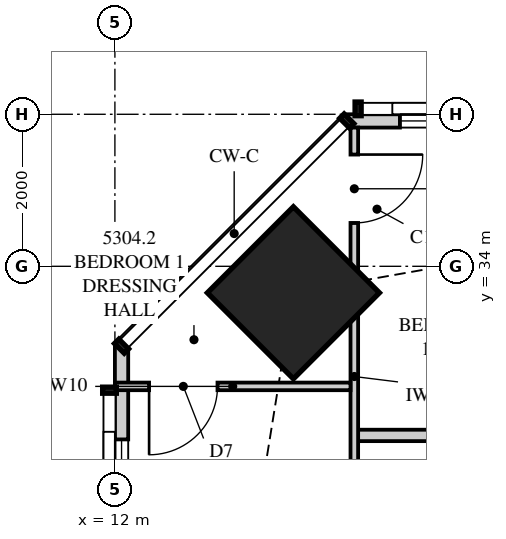
"""IFC4 building model, lengths in metres.
Left out: names, types, materials, properties, quantities, classifications, styles, units other than length and angle.
Written with IfcOpenShell. Run it as: python <this file> out.ifc"""

import sys

from ifc_helpers import new_model, si_unit, direction, frame, frame_2d, origin, origin_2d, place, context, subcontext, project, spatial, polyline, rectangle, outline, extrude, element, fill, save


model = new_model("IFC4")
c1 = context("Model", 3, precision=1e-05, world=origin(), true_north=direction((0.0, 1.0)))
c2 = subcontext(c1, "Body", "Model", "MODEL_VIEW")
j1 = project(units=[si_unit("LENGTHUNIT", "METRE"), si_unit("PLANEANGLEUNIT", "RADIAN")], contexts=[c1])
p1 = place(None, origin())
s1 = spatial("IfcSite", under=j1, at=p1, CompositionType="ELEMENT")
p2 = place(p1, origin())
s2 = spatial("IfcBuilding", under=s1, at=p2, CompositionType="ELEMENT")
p3 = place(p2, frame((0.0, 0.0, 194.55)))
s3 = spatial("IfcBuildingStorey", under=s2, at=p3, CompositionType="ELEMENT", Elevation=194.55)
p4 = place(p3, frame((14.348, 33.652, 0.0), z_axis=(0.0, 0.0, 1.0), x_axis=(0.707106781187, 0.707106781187, 0.0)))
e1 = element("IfcColumn", 1, at=p4, inside=s3, PredefinedType="COLUMN", context=c2, shape_type="SweptSolid", body=[
    extrude(rectangle(XDim=1.6, YDim=1.6, at=origin_2d()), origin(), (0.0, 0.0, 1.0), 3.35),
])
p5 = place(p3, frame((49.949, 35.913, 0.0), z_axis=(0.0, 0.0, 1.0), x_axis=(-1.0, 0.0, 0.0)))
e2 = element("IfcWall", 2, at=p5, inside=s3, PredefinedType="SOLIDWALL", context=c2, shape_type="SweptSolid", body=[
    extrude(outline(polyline([(0.0, 0.0), (34.897, 0.0), (34.897, 3.11), (27.91, 3.11), (27.91, 2.15), (27.836, 2.15), (27.836, 3.11), (27.699, 3.11), (27.699, 2.15), (7.199, 2.15), (7.199, 3.11), (7.062, 3.11), (7.062, 2.15), (6.987, 2.15), (6.987, 3.11), (0.0, 3.11), (0.0, 0.0)])), frame((0.0, 0.087, 0.0), z_axis=(0.0, -1.0, 0.0), x_axis=(1.0, 0.0, 0.0)), (0.0, 0.0, 1.0), 0.175),
])
p6 = place(p5, frame((2.149, 0.0, 0.4)))
e3 = element("IfcOpeningElement", 3, at=p6, cuts=e2, PredefinedType="OPENING", context=c2, shape_type="SweptSolid", body=[
    extrude(rectangle(XDim=1.8, YDim=1.7, at=frame_2d((0.9, 0.85))), frame((0.0, 0.097, 0.0), z_axis=(0.0, -1.0, 0.0), x_axis=(1.0, 0.0, 0.0)), (0.0, 0.0, 1.0), 0.195),
])
p7 = place(p5, frame((9.636, 0.0, 0.4)))
e4 = element("IfcOpeningElement", 4, at=p7, cuts=e2, PredefinedType="OPENING", context=c2, shape_type="SweptSolid", body=[
    extrude(rectangle(XDim=1.8, YDim=1.7, at=frame_2d((0.9, 0.85))), frame((0.0, 0.097, 0.0), z_axis=(0.0, -1.0, 0.0), x_axis=(1.0, 0.0, 0.0)), (0.0, 0.0, 1.0), 0.195),
])
p8 = place(p5, frame((13.174, 0.0, 0.0)))
e5 = element("IfcOpeningElement", 5, at=p8, cuts=e2, PredefinedType="OPENING", context=c2, shape_type="SweptSolid", body=[
    extrude(rectangle(XDim=1.8, YDim=2.1, at=frame_2d((0.9, 1.05))), frame((0.0, 0.097, 0.0), z_axis=(0.0, -1.0, 0.0), x_axis=(1.0, 0.0, 0.0)), (0.0, 0.0, 1.0), 0.195),
])
p9 = place(p5, frame((19.374, 0.0, 0.4)))
e6 = element("IfcOpeningElement", 6, at=p9, cuts=e2, PredefinedType="OPENING", context=c2, shape_type="SweptSolid", body=[
    extrude(rectangle(XDim=1.8, YDim=1.7, at=frame_2d((0.9, 0.85))), frame((0.0, 0.097, 0.0), z_axis=(0.0, -1.0, 0.0), x_axis=(1.0, 0.0, 0.0)), (0.0, 0.0, 1.0), 0.195),
])
p10 = place(p5, frame((23.224, 0.0, 0.4)))
e7 = element("IfcOpeningElement", 7, at=p10, cuts=e2, PredefinedType="OPENING", context=c2, shape_type="SweptSolid", body=[
    extrude(rectangle(XDim=2.4, YDim=1.7, at=frame_2d((1.2, 0.85))), frame((0.0, 0.097, 0.0), z_axis=(0.0, -1.0, 0.0), x_axis=(1.0, 0.0, 0.0)), (0.0, 0.0, 1.0), 0.195),
])
p11 = place(p5, frame((32.399, 0.0, 0.4)))
e8 = element("IfcOpeningElement", 8, at=p11, cuts=e2, PredefinedType="OPENING", context=c2, shape_type="SweptSolid", body=[
    extrude(rectangle(XDim=1.8, YDim=1.7, at=frame_2d((0.9, 0.85))), frame((0.0, 0.097, 0.0), z_axis=(0.0, -1.0, 0.0), x_axis=(1.0, 0.0, 0.0)), (0.0, 0.0, 1.0), 0.195),
])
p12 = place(p3, frame((12.087, 32.949, 0.0), z_axis=(0.0, 0.0, 1.0), x_axis=(0.0, -1.0, 0.0)))
e9 = element("IfcWall", 9, at=p12, inside=s3, PredefinedType="SOLIDWALL", context=c2, shape_type="SweptSolid", body=[
    extrude(outline(polyline([(0.0, 0.0), (29.897, 0.0), (29.897, 3.11), (20.191, 3.11), (20.191, 2.15), (20.051, 2.15), (20.051, 3.11), (19.949, 3.11), (19.949, 2.15), (7.949, 2.15), (7.949, 3.11), (7.823, 3.11), (7.823, 2.15), (7.73, 2.15), (7.73, 3.11), (0.0, 3.11), (0.0, 0.0)])), frame((0.0, 0.087, 0.0), z_axis=(0.0, -1.0, 0.0), x_axis=(1.0, 0.0, 0.0)), (0.0, 0.0, 1.0), 0.175),
])
p13 = place(p12, frame((1.226, 0.0, 0.4)))
e10 = element("IfcOpeningElement", 10, at=p13, cuts=e9, PredefinedType="OPENING", context=c2, shape_type="SweptSolid", body=[
    extrude(rectangle(XDim=1.8, YDim=1.7, at=frame_2d((0.9, 0.85))), frame((0.0, 0.097, 0.0), z_axis=(0.0, -1.0, 0.0), x_axis=(1.0, 0.0, 0.0)), (0.0, 0.0, 1.0), 0.195),
])
p14 = place(p12, frame((9.899, 0.0, 0.4)))
e11 = element("IfcOpeningElement", 11, at=p14, cuts=e9, PredefinedType="OPENING", context=c2, shape_type="SweptSolid", body=[
    extrude(rectangle(XDim=1.8, YDim=1.7, at=frame_2d((0.9, 0.85))), frame((0.0, 0.097, 0.0), z_axis=(0.0, -1.0, 0.0), x_axis=(1.0, 0.0, 0.0)), (0.0, 0.0, 1.0), 0.195),
])
p15 = place(p12, frame((13.024, 0.0, 0.4)))
e12 = element("IfcOpeningElement", 12, at=p15, cuts=e9, PredefinedType="OPENING", context=c2, shape_type="SweptSolid", body=[
    extrude(rectangle(XDim=1.8, YDim=1.7, at=frame_2d((0.9, 0.85))), frame((0.0, 0.097, 0.0), z_axis=(0.0, -1.0, 0.0), x_axis=(1.0, 0.0, 0.0)), (0.0, 0.0, 1.0), 0.195),
])
p16 = place(p12, frame((16.201, 0.0, 0.4)))
e13 = element("IfcOpeningElement", 13, at=p16, cuts=e9, PredefinedType="OPENING", context=c2, shape_type="SweptSolid", body=[
    extrude(rectangle(XDim=1.8, YDim=1.7, at=frame_2d((0.9, 0.85))), frame((0.0, 0.097, 0.0), z_axis=(0.0, -1.0, 0.0), x_axis=(1.0, 0.0, 0.0)), (0.0, 0.0, 1.0), 0.195),
])
p17 = place(p12, frame((22.624, 0.0, 0.0)))
e14 = element("IfcOpeningElement", 14, at=p17, cuts=e9, PredefinedType="OPENING", context=c2, shape_type="SweptSolid", body=[
    extrude(rectangle(XDim=1.8, YDim=2.1, at=frame_2d((0.9, 1.05))), frame((0.0, 0.097, 0.0), z_axis=(0.0, -1.0, 0.0), x_axis=(1.0, 0.0, 0.0)), (0.0, 0.0, 1.0), 0.195),
])
p18 = place(p12, frame((26.099, 0.0, 0.4)))
e15 = element("IfcOpeningElement", 15, at=p18, cuts=e9, PredefinedType="OPENING", context=c2, shape_type="SweptSolid", body=[
    extrude(rectangle(XDim=1.2, YDim=1.7, at=frame_2d((0.6, 0.85))), frame((0.0, 0.097, 0.0), z_axis=(0.0, -1.0, 0.0), x_axis=(1.0, 0.0, 0.0)), (0.0, 0.0, 1.0), 0.195),
])
p19 = place(p3, frame((15.15, 35.825, 0.0), z_axis=(0.0, 0.0, 1.0), x_axis=(0.0, -1.0, 0.0)))
e16 = element("IfcWall", 16, at=p19, inside=s3, PredefinedType="PARTITIONING", context=c2, shape_type="SweptSolid", body=[
    extrude(outline(polyline([(0.0, 0.0), (6.55, 0.0), (6.55, 3.11), (2.905, 3.11), (2.905, 2.15), (1.158, 2.15), (1.158, 3.11), (0.0, 3.11), (0.0, 0.0)])), frame((0.0, 0.05, 0.0), z_axis=(0.0, -1.0, 0.0), x_axis=(1.0, 0.0, 0.0)), (0.0, 0.0, 1.0), 0.1),
])
p20 = place(p19, frame((0.355, 0.0, 0.0)))
e17 = element("IfcOpeningElement", 17, at=p20, cuts=e16, PredefinedType="OPENING", context=c2, shape_type="SweptSolid", body=[
    extrude(rectangle(XDim=0.9, YDim=2.1, at=frame_2d((0.45, 1.05))), frame((0.0, 0.06, 0.0), z_axis=(0.0, -1.0, 0.0), x_axis=(1.0, 0.0, 0.0)), (0.0, 0.0, 1.0), 0.12),
])
p21 = place(p19, frame((4.527, 0.0, 0.0)))
e18 = element("IfcOpeningElement", 18, at=p21, cuts=e16, PredefinedType="OPENING", context=c2, shape_type="SweptSolid", body=[
    extrude(rectangle(XDim=0.9, YDim=2.1, at=frame_2d((0.45, 1.05))), frame((0.0, 0.06, 0.0), z_axis=(0.0, -1.0, 0.0), x_axis=(1.0, 0.0, 0.0)), (0.0, 0.0, 1.0), 0.12),
])
p22 = place(p3, frame((12.0, 32.42, 0.0), z_axis=(0.0, 0.0, 1.0), x_axis=(1.0, 0.0, 0.0)))
e19 = element("IfcWall", 19, at=p22, inside=s3, PredefinedType="PARTITIONING", context=c2, shape_type="SweptSolid", body=[
    extrude(outline(polyline([(0.0, 0.0), (3.1, 0.0), (3.1, 3.11), (3.021, 3.11), (3.021, 2.15), (1.278, 2.15), (1.278, 3.11), (0.0, 3.11), (0.0, 0.0)])), frame((0.0, 0.05, 0.0), z_axis=(0.0, -1.0, 0.0), x_axis=(1.0, 0.0, 0.0)), (0.0, 0.0, 1.0), 0.1),
])
p23 = place(p22, frame((0.45, 0.0, 0.0)))
e20 = element("IfcOpeningElement", 20, at=p23, cuts=e19, PredefinedType="OPENING", context=c2, shape_type="SweptSolid", body=[
    extrude(rectangle(XDim=0.9, YDim=2.1, at=frame_2d((0.45, 1.05))), frame((0.0, 0.06, 0.0), z_axis=(0.0, -1.0, 0.0), x_axis=(1.0, 0.0, 0.0)), (0.0, 0.0, 1.0), 0.12),
])
p24 = place(p3, frame((15.2, 31.775, 0.0), z_axis=(0.0, 0.0, 1.0), x_axis=(1.0, 0.0, 0.0)))
e21 = element("IfcWall", 21, at=p24, inside=s3, PredefinedType="PLUMBINGWALL", context=c2, shape_type="SweptSolid", body=[
    extrude(rectangle(XDim=2.9, YDim=0.15, at=frame_2d((1.45, 0.0))), origin(), (0.0, 0.0, 1.0), 3.11),
])
p25 = place(p11, origin())
e22 = element("IfcWindow", 22, at=p25, inside=s3, PartitioningType="SINGLE_PANEL", PredefinedType="WINDOW", context=c2, shape_type="SweptSolid", body=[
    extrude(rectangle(XDim=1.8, YDim=1.7, at=frame_2d((0.9, 0.85))), frame((0.0, 0.03, 0.0), z_axis=(0.0, -1.0, 0.0), x_axis=(1.0, 0.0, 0.0)), (0.0, 0.0, 1.0), 0.06),
])
fill(e8, e22)
p26 = place(p13, origin())
e23 = element("IfcWindow", 23, at=p26, inside=s3, PartitioningType="SINGLE_PANEL", PredefinedType="WINDOW", context=c2, shape_type="SweptSolid", body=[
    extrude(rectangle(XDim=1.8, YDim=1.7, at=frame_2d((0.9, 0.85))), frame((0.0, 0.03, 0.0), z_axis=(0.0, -1.0, 0.0), x_axis=(1.0, 0.0, 0.0)), (0.0, 0.0, 1.0), 0.06),
])
fill(e10, e23)
p27 = place(p23, frame((0.9, 0.0, 0.0), z_axis=(0.0, 0.0, 1.0), x_axis=(-1.0, 0.0, 0.0)))
e24 = element("IfcDoor", 24, at=p27, inside=s3, OperationType="SINGLE_SWING_RIGHT", PredefinedType="DOOR", context=c2, shape_type="SweptSolid", body=[
    extrude(rectangle(XDim=0.9, YDim=2.1, at=frame_2d((0.45, 1.05))), frame((0.0, 0.025, 0.0), z_axis=(0.0, -1.0, 0.0), x_axis=(1.0, 0.0, 0.0)), (0.0, 0.0, 1.0), 0.05),
])
fill(e20, e24)
p28 = place(p20, origin())
e25 = element("IfcDoor", 25, at=p28, inside=s3, OperationType="SINGLE_SWING_LEFT", PredefinedType="DOOR", context=c2, shape_type="SweptSolid", body=[
    extrude(rectangle(XDim=0.9, YDim=2.1, at=frame_2d((0.45, 1.05))), frame((0.0, 0.025, 0.0), z_axis=(0.0, -1.0, 0.0), x_axis=(1.0, 0.0, 0.0)), (0.0, 0.0, 1.0), 0.05),
])
fill(e17, e25)
save(model, sys.argv[1])
